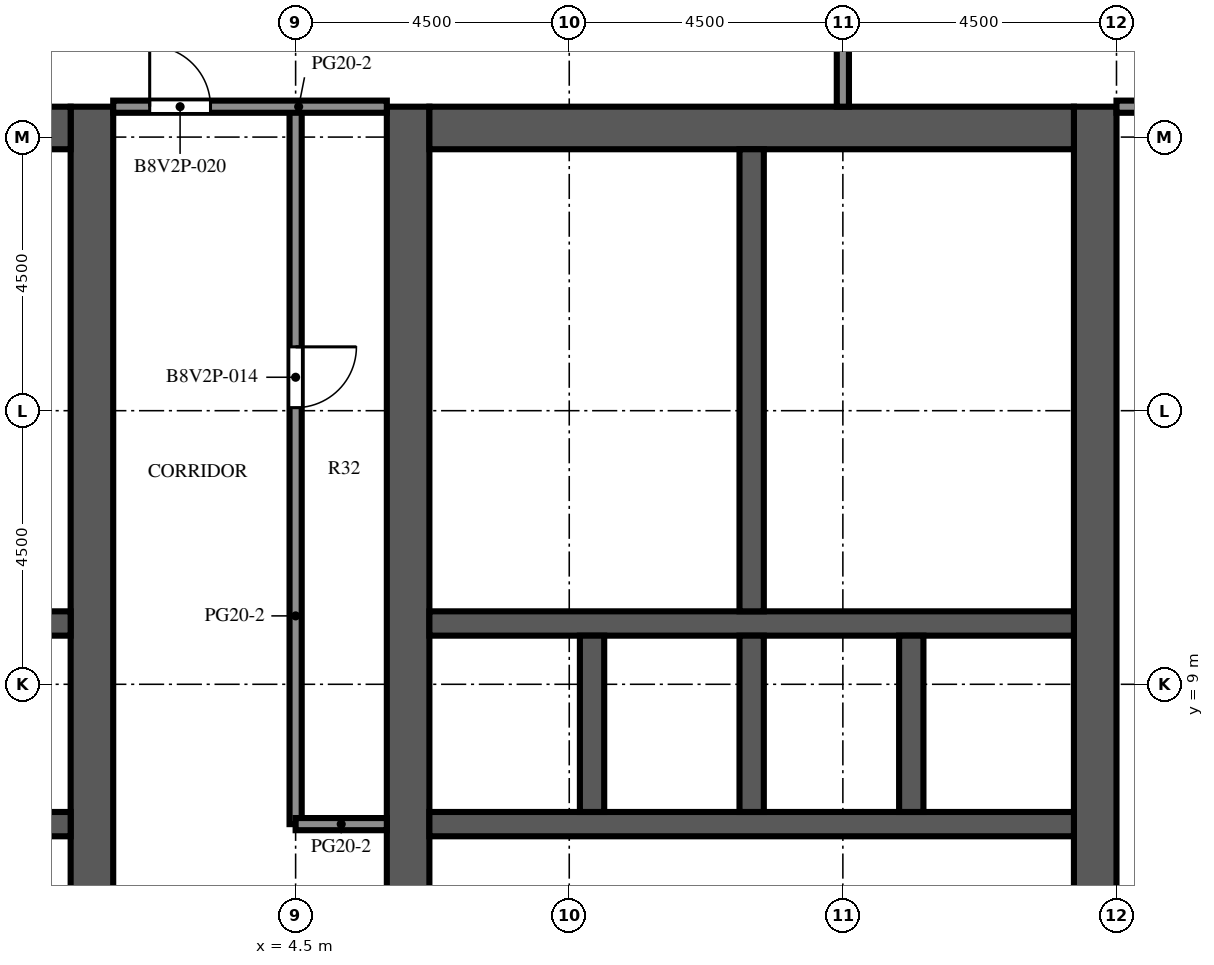
"""IFC4 building model, lengths in metres.
Left out: names, types, materials, properties, quantities, classifications, styles, units other than length and angle.
Written with IfcOpenShell. Run it as: python <this file> out.ifc"""

import sys

from ifc_helpers import new_model, si_unit, direction, frame, frame_2d, origin, place, context, subcontext, project, spatial, rectangle, extrude, element, fill, save


model = new_model("IFC4")
c1 = context("Model", 3, precision=1e-05, world=origin(), true_north=direction((0.0, 1.0)))
c2 = subcontext(c1, "Body", "Model", "MODEL_VIEW")
j1 = project(units=[si_unit("LENGTHUNIT", "METRE"), si_unit("PLANEANGLEUNIT", "RADIAN")], contexts=[c1])
p1 = place(None, origin())
s1 = spatial("IfcSite", under=j1, at=p1, CompositionType="ELEMENT")
p2 = place(p1, origin())
s2 = spatial("IfcBuilding", under=s1, at=p2, CompositionType="ELEMENT")
p3 = place(p2, frame((0.0, 0.0, 290.9)))
s3 = spatial("IfcBuildingStorey", under=s2, at=p3, CompositionType="ELEMENT", Elevation=290.9)
p4 = place(p3, frame((1.15, -9.0, 0.0), z_axis=(0.0, 0.0, 1.0), x_axis=(0.0, 1.0, 0.0)))
e1 = element("IfcWall", 1, at=p4, inside=s3, PredefinedType="SHEAR", context=c2, shape_type="SweptSolid", body=[
    extrude(rectangle(XDim=27.5, YDim=0.7, at=frame_2d((13.75, 0.0))), origin(), (0.0, 0.0, 1.0), 4.1),
])
p5 = place(p4, frame((12.55, 0.0, 0.0)))
e2 = element("IfcOpeningElement", 2, at=p5, cuts=e1, PredefinedType="OPENING", context=c2, shape_type="SweptSolid", body=[
    extrude(rectangle(XDim=2.4, YDim=2.4, at=frame_2d((1.2, 1.2))), frame((0.0, 0.36, 0.0), z_axis=(0.0, -1.0, 0.0), x_axis=(1.0, 0.0, 0.0)), (0.0, 0.0, 1.0), 0.72),
])
p6 = place(p4, frame((3.9, 0.0, 0.0)))
e3 = element("IfcOpeningElement", 3, at=p6, cuts=e1, PredefinedType="OPENING", context=c2, shape_type="SweptSolid", body=[
    extrude(rectangle(XDim=1.2, YDim=2.1, at=frame_2d((0.6, 1.05))), frame((0.0, 0.36, 0.0), z_axis=(0.0, -1.0, 0.0), x_axis=(1.0, 0.0, 0.0)), (0.0, 0.0, 1.0), 0.72),
])
p7 = place(p4, frame((22.4, 0.0, 0.0)))
e4 = element("IfcOpeningElement", 4, at=p7, cuts=e1, PredefinedType="OPENING", context=c2, shape_type="SweptSolid", body=[
    extrude(rectangle(XDim=1.2, YDim=2.1, at=frame_2d((0.6, 1.05))), frame((0.0, 0.36, 0.0), z_axis=(0.0, -1.0, 0.0), x_axis=(1.0, 0.0, 0.0)), (0.0, 0.0, 1.0), 0.72),
])
p8 = place(p3, frame((-9.8, 18.15, 0.0), z_axis=(0.0, 0.0, 1.0), x_axis=(1.0, 0.0, 0.0)))
e5 = element("IfcWall", 5, at=p8, inside=s3, PredefinedType="SHEAR", context=c2, shape_type="SweptSolid", body=[
    extrude(rectangle(XDim=10.6, YDim=0.7, at=frame_2d((5.3, 0.0))), origin(), (0.0, 0.0, 1.0), 4.1),
])
p9 = place(p3, frame((-9.8, 6.7, 0.0), z_axis=(0.0, 0.0, 1.0), x_axis=(1.0, 0.0, 0.0)))
e6 = element("IfcWall", 6, at=p9, inside=s3, PredefinedType="SHEAR", context=c2, shape_type="SweptSolid", body=[
    extrude(rectangle(XDim=10.6, YDim=0.4, at=frame_2d((5.3, 0.0))), origin(), (0.0, 0.0, 1.0), 4.1),
])
p10 = place(p9, frame((3.438, 0.0, 0.0)))
e7 = element("IfcOpeningElement", 7, at=p10, cuts=e6, PredefinedType="OPENING", context=c2, shape_type="SweptSolid", body=[
    extrude(rectangle(XDim=1.1, YDim=2.1, at=frame_2d((0.55, 1.05))), frame((0.0, 0.21, 0.0), z_axis=(0.0, -1.0, 0.0), x_axis=(1.0, 0.0, 0.0)), (0.0, 0.0, 1.0), 0.42),
])
p11 = place(p9, frame((6.062, 0.0, 0.0)))
e8 = element("IfcOpeningElement", 8, at=p11, cuts=e6, PredefinedType="OPENING", context=c2, shape_type="SweptSolid", body=[
    extrude(rectangle(XDim=1.1, YDim=2.1, at=frame_2d((0.55, 1.05))), frame((0.0, 0.21, 0.0), z_axis=(0.0, -1.0, 0.0), x_axis=(1.0, 0.0, 0.0)), (0.0, 0.0, 1.0), 0.42),
])
p12 = place(p9, frame((8.812, 0.0, 0.0)))
e9 = element("IfcOpeningElement", 9, at=p12, cuts=e6, PredefinedType="OPENING", context=c2, shape_type="SweptSolid", body=[
    extrude(rectangle(XDim=1.1, YDim=2.1, at=frame_2d((0.55, 1.05))), frame((0.0, 0.21, 0.0), z_axis=(0.0, -1.0, 0.0), x_axis=(1.0, 0.0, 0.0)), (0.0, 0.0, 1.0), 0.42),
])
p13 = place(p9, frame((0.738, 0.0, 0.0)))
e10 = element("IfcOpeningElement", 10, at=p13, cuts=e6, PredefinedType="OPENING", context=c2, shape_type="SweptSolid", body=[
    extrude(rectangle(XDim=1.0, YDim=2.1, at=frame_2d((0.5, 1.05))), frame((0.0, 0.21, 0.0), z_axis=(0.0, -1.0, 0.0), x_axis=(1.0, 0.0, 0.0)), (0.0, 0.0, 1.0), 0.42),
])
p14 = place(p3, frame((-9.8, 10.0, 0.0), z_axis=(0.0, 0.0, 1.0), x_axis=(1.0, 0.0, 0.0)))
e11 = element("IfcWall", 11, at=p14, inside=s3, PredefinedType="SHEAR", context=c2, shape_type="SweptSolid", body=[
    extrude(rectangle(XDim=10.6, YDim=0.4, at=frame_2d((5.3, 0.0))), origin(), (0.0, 0.0, 1.0), 4.1),
])
p15 = place(p3, frame((6.35, -9.0, 0.0), z_axis=(0.0, 0.0, 1.0), x_axis=(0.0, 1.0, 0.0)))
e12 = element("IfcWall", 12, at=p15, inside=s3, PredefinedType="SHEAR", context=c2, shape_type="SweptSolid", body=[
    extrude(rectangle(XDim=27.5, YDim=0.7, at=frame_2d((13.75, 0.0))), origin(), (0.0, 0.0, 1.0), 4.1),
])
p16 = place(p15, frame((12.55, 0.0, 0.0)))
e13 = element("IfcOpeningElement", 13, at=p16, cuts=e12, PredefinedType="OPENING", context=c2, shape_type="SweptSolid", body=[
    extrude(rectangle(XDim=2.4, YDim=2.4, at=frame_2d((1.2, 1.2))), frame((0.0, 0.36, 0.0), z_axis=(0.0, -1.0, 0.0), x_axis=(1.0, 0.0, 0.0)), (0.0, 0.0, 1.0), 0.72),
])
p17 = place(p15, frame((3.9, 0.0, 0.0)))
e14 = element("IfcOpeningElement", 14, at=p17, cuts=e12, PredefinedType="OPENING", context=c2, shape_type="SweptSolid", body=[
    extrude(rectangle(XDim=1.2, YDim=2.1, at=frame_2d((0.6, 1.05))), frame((0.0, 0.36, 0.0), z_axis=(0.0, -1.0, 0.0), x_axis=(1.0, 0.0, 0.0)), (0.0, 0.0, 1.0), 0.72),
])
p18 = place(p15, frame((22.4, 0.0, 0.0)))
e15 = element("IfcOpeningElement", 15, at=p18, cuts=e12, PredefinedType="OPENING", context=c2, shape_type="SweptSolid", body=[
    extrude(rectangle(XDim=1.2, YDim=2.1, at=frame_2d((0.6, 1.05))), frame((0.0, 0.36, 0.0), z_axis=(0.0, -1.0, 0.0), x_axis=(1.0, 0.0, 0.0)), (0.0, 0.0, 1.0), 0.72),
])
p19 = place(p3, frame((17.65, -9.0, 0.0), z_axis=(0.0, 0.0, 1.0), x_axis=(0.0, 1.0, 0.0)))
e16 = element("IfcWall", 16, at=p19, inside=s3, PredefinedType="SHEAR", context=c2, shape_type="SweptSolid", body=[
    extrude(rectangle(XDim=27.5, YDim=0.7, at=frame_2d((13.75, 0.0))), origin(), (0.0, 0.0, 1.0), 4.1),
])
p20 = place(p19, frame((12.55, 0.0, 0.0)))
e17 = element("IfcOpeningElement", 17, at=p20, cuts=e16, PredefinedType="OPENING", context=c2, shape_type="SweptSolid", body=[
    extrude(rectangle(XDim=2.4, YDim=2.4, at=frame_2d((1.2, 1.2))), frame((0.0, 0.36, 0.0), z_axis=(0.0, -1.0, 0.0), x_axis=(1.0, 0.0, 0.0)), (0.0, 0.0, 1.0), 0.72),
])
p21 = place(p19, frame((6.825, 0.0, 0.0)))
e18 = element("IfcOpeningElement", 18, at=p21, cuts=e16, PredefinedType="OPENING", context=c2, shape_type="SweptSolid", body=[
    extrude(rectangle(XDim=1.2, YDim=2.1, at=frame_2d((0.6, 1.05))), frame((0.0, 0.36, 0.0), z_axis=(0.0, -1.0, 0.0), x_axis=(1.0, 0.0, 0.0)), (0.0, 0.0, 1.0), 0.72),
])
p22 = place(p19, frame((19.475, 0.0, 0.0)))
e19 = element("IfcOpeningElement", 19, at=p22, cuts=e16, PredefinedType="OPENING", context=c2, shape_type="SweptSolid", body=[
    extrude(rectangle(XDim=1.2, YDim=2.1, at=frame_2d((0.6, 1.05))), frame((0.0, 0.36, 0.0), z_axis=(0.0, -1.0, 0.0), x_axis=(1.0, 0.0, 0.0)), (0.0, 0.0, 1.0), 0.72),
])
p23 = place(p3, frame((6.7, 18.15, 0.0), z_axis=(0.0, 0.0, 1.0), x_axis=(1.0, 0.0, 0.0)))
e20 = element("IfcWall", 20, at=p23, inside=s3, PredefinedType="SHEAR", context=c2, shape_type="SweptSolid", body=[
    extrude(rectangle(XDim=10.6, YDim=0.7, at=frame_2d((5.3, 0.0))), origin(), (0.0, 0.0, 1.0), 4.1),
])
p24 = place(p3, frame((6.7, 6.7, 0.0), z_axis=(0.0, 0.0, 1.0), x_axis=(1.0, 0.0, 0.0)))
e21 = element("IfcWall", 21, at=p24, inside=s3, PredefinedType="SHEAR", context=c2, shape_type="SweptSolid", body=[
    extrude(rectangle(XDim=10.6, YDim=0.4, at=frame_2d((5.3, 0.0))), origin(), (0.0, 0.0, 1.0), 4.1),
])
p25 = place(p24, frame((3.438, 0.0, 0.0)))
e22 = element("IfcOpeningElement", 22, at=p25, cuts=e21, PredefinedType="OPENING", context=c2, shape_type="SweptSolid", body=[
    extrude(rectangle(XDim=1.1, YDim=2.1, at=frame_2d((0.55, 1.05))), frame((0.0, 0.21, 0.0), z_axis=(0.0, -1.0, 0.0), x_axis=(1.0, 0.0, 0.0)), (0.0, 0.0, 1.0), 0.42),
])
p26 = place(p24, frame((6.062, 0.0, 0.0)))
e23 = element("IfcOpeningElement", 23, at=p26, cuts=e21, PredefinedType="OPENING", context=c2, shape_type="SweptSolid", body=[
    extrude(rectangle(XDim=1.1, YDim=2.1, at=frame_2d((0.55, 1.05))), frame((0.0, 0.21, 0.0), z_axis=(0.0, -1.0, 0.0), x_axis=(1.0, 0.0, 0.0)), (0.0, 0.0, 1.0), 0.42),
])
p27 = place(p24, frame((8.812, 0.0, 0.0)))
e24 = element("IfcOpeningElement", 24, at=p27, cuts=e21, PredefinedType="OPENING", context=c2, shape_type="SweptSolid", body=[
    extrude(rectangle(XDim=1.1, YDim=2.1, at=frame_2d((0.55, 1.05))), frame((0.0, 0.21, 0.0), z_axis=(0.0, -1.0, 0.0), x_axis=(1.0, 0.0, 0.0)), (0.0, 0.0, 1.0), 0.42),
])
p28 = place(p24, frame((0.738, 0.0, 0.0)))
e25 = element("IfcOpeningElement", 25, at=p28, cuts=e21, PredefinedType="OPENING", context=c2, shape_type="SweptSolid", body=[
    extrude(rectangle(XDim=1.0, YDim=2.1, at=frame_2d((0.5, 1.05))), frame((0.0, 0.21, 0.0), z_axis=(0.0, -1.0, 0.0), x_axis=(1.0, 0.0, 0.0)), (0.0, 0.0, 1.0), 0.42),
])
p29 = place(p3, frame((6.7, 10.0, 0.0), z_axis=(0.0, 0.0, 1.0), x_axis=(1.0, 0.0, 0.0)))
e26 = element("IfcWall", 26, at=p29, inside=s3, PredefinedType="SHEAR", context=c2, shape_type="SweptSolid", body=[
    extrude(rectangle(XDim=10.6, YDim=0.4, at=frame_2d((5.3, 0.0))), origin(), (0.0, 0.0, 1.0), 4.1),
])
for number, where, z_axis, x_axis in (
    (27, (9.375, 6.9, 0.0), (0.0, 0.0, 1.0), (0.0, 1.0, 0.0)),
    (28, (12.0, 6.9, 0.0), (0.0, 0.0, 1.0), (0.0, 1.0, 0.0)),
    (29, (14.625, 6.9, 0.0), (0.0, 0.0, 1.0), (0.0, 1.0, 0.0)),
):
    element("IfcWall", number, at=place(p3, frame(where, z_axis=z_axis, x_axis=x_axis)), inside=s3, PredefinedType="SHEAR", context=c2, shape_type="SweptSolid", body=[
        extrude(rectangle(XDim=2.9, YDim=0.4, at=frame_2d((1.45, 0.0))), origin(), (0.0, 0.0, 1.0), 4.1),
    ])
p30 = place(p3, frame((12.0, 10.2, 0.0), z_axis=(0.0, 0.0, 1.0), x_axis=(0.0, 1.0, 0.0)))
e30 = element("IfcWall", 30, at=p30, inside=s3, PredefinedType="SHEAR", context=c2, shape_type="SweptSolid", body=[
    extrude(rectangle(XDim=7.6, YDim=0.4, at=frame_2d((3.8, 0.0))), origin(), (0.0, 0.0, 1.0), 4.1),
])
p31 = place(p3, frame((8.1, 10.2, 0.0), z_axis=(0.0, 0.0, 1.0), x_axis=(0.0, 1.0, 0.0)))
e31 = element("IfcWall", 31, at=p31, inside=s3, PredefinedType="PARTITIONING", context=c2, shape_type="SweptSolid", body=[
    extrude(rectangle(XDim=2.28, YDim=0.1, at=frame_2d((1.14, 0.0))), origin(), (0.0, 0.0, 1.0), 3.5),
])
p32 = place(p31, frame((0.64, 0.0, 0.0)))
e32 = element("IfcOpeningElement", 32, at=p32, cuts=e31, PredefinedType="OPENING", context=c2, shape_type="SweptSolid", body=[
    extrude(rectangle(XDim=1.0, YDim=2.1, at=frame_2d((0.5, 1.05))), frame((0.0, 0.06, 0.0), z_axis=(0.0, -1.0, 0.0), x_axis=(1.0, 0.0, 0.0)), (0.0, 0.0, 1.0), 0.12),
])
p33 = place(p3, frame((8.1, 12.48, 0.0), z_axis=(0.0, 0.0, 1.0), x_axis=(0.0, 1.0, 0.0)))
e33 = element("IfcWall", 33, at=p33, inside=s3, PredefinedType="PARTITIONING", context=c2, shape_type="SweptSolid", body=[
    extrude(rectangle(XDim=2.432, YDim=0.1, at=frame_2d((1.216, 0.0))), origin(), (0.0, 0.0, 1.0), 3.5),
])
p34 = place(p33, frame((0.716, 0.0, 0.0)))
e34 = element("IfcOpeningElement", 34, at=p34, cuts=e33, PredefinedType="OPENING", context=c2, shape_type="SweptSolid", body=[
    extrude(rectangle(XDim=1.0, YDim=2.1, at=frame_2d((0.5, 1.05))), frame((0.0, 0.06, 0.0), z_axis=(0.0, -1.0, 0.0), x_axis=(1.0, 0.0, 0.0)), (0.0, 0.0, 1.0), 0.12),
])
p35 = place(p3, frame((8.1, 14.912, 0.0), z_axis=(0.0, 0.0, 1.0), x_axis=(0.0, 1.0, 0.0)))
e35 = element("IfcWall", 35, at=p35, inside=s3, PredefinedType="PARTITIONING", context=c2, shape_type="SweptSolid", body=[
    extrude(rectangle(XDim=2.888, YDim=0.1, at=frame_2d((1.444, 0.0))), origin(), (0.0, 0.0, 1.0), 3.5),
])
p36 = place(p35, frame((0.944, 0.0, 0.0)))
e36 = element("IfcOpeningElement", 36, at=p36, cuts=e35, PredefinedType="OPENING", context=c2, shape_type="SweptSolid", body=[
    extrude(rectangle(XDim=1.0, YDim=2.1, at=frame_2d((0.5, 1.05))), frame((0.0, 0.06, 0.0), z_axis=(0.0, -1.0, 0.0), x_axis=(1.0, 0.0, 0.0)), (0.0, 0.0, 1.0), 0.12),
])
for number, where, z_axis, x_axis in (
    (37, (8.1, 12.48, 0.0), (0.0, 0.0, 1.0), (1.0, 0.0, 0.0)),
    (38, (8.1, 14.912, 0.0), (0.0, 0.0, 1.0), (1.0, 0.0, 0.0)),
):
    element("IfcWall", number, at=place(p3, frame(where, z_axis=z_axis, x_axis=x_axis)), inside=s3, PredefinedType="PARTITIONING", context=c2, shape_type="SweptSolid", body=[
        extrude(rectangle(XDim=3.7, YDim=0.1, at=frame_2d((1.85, 0.0))), origin(), (0.0, 0.0, 1.0), 3.5),
    ])
p37 = place(p3, frame((4.5, 18.5, 0.0), z_axis=(0.0, 0.0, 1.0), x_axis=(0.0, -1.0, 0.0)))
e39 = element("IfcWall", 39, at=p37, inside=s3, PredefinedType="PARTITIONING", context=c2, shape_type="SweptSolid", body=[
    extrude(rectangle(XDim=11.8, YDim=0.2, at=frame_2d((5.9, 0.0))), origin(), (0.0, 0.0, 1.0), 3.5),
])
p38 = place(p37, frame((3.95, 0.0, 0.0)))
e40 = element("IfcOpeningElement", 40, at=p38, cuts=e39, PredefinedType="OPENING", context=c2, shape_type="SweptSolid", body=[
    extrude(rectangle(XDim=1.0, YDim=2.1, at=frame_2d((0.5, 1.05))), frame((0.0, 0.11, 0.0), z_axis=(0.0, -1.0, 0.0), x_axis=(1.0, 0.0, 0.0)), (0.0, 0.0, 1.0), 0.22),
])
p39 = place(p3, frame((13.5, 18.5, 0.0), z_axis=(0.0, 0.0, 1.0), x_axis=(0.0, 1.0, 0.0)))
e41 = element("IfcWall", 41, at=p39, inside=s3, PredefinedType="PARTITIONING", context=c2, shape_type="SweptSolid", body=[
    extrude(rectangle(XDim=8.1, YDim=0.2, at=frame_2d((4.05, 0.0))), origin(), (0.0, 0.0, 1.0), 3.5),
])
p40 = place(p3, frame((4.5, 6.7, 0.0), z_axis=(0.0, 0.0, 1.0), x_axis=(1.0, 0.0, 0.0)))
e42 = element("IfcWall", 42, at=p40, inside=s3, PredefinedType="PARTITIONING", context=c2, shape_type="SweptSolid", body=[
    extrude(rectangle(XDim=1.5, YDim=0.2, at=frame_2d((0.75, 0.0))), origin(), (0.0, 0.0, 1.0), 3.5),
])
p41 = place(p3, frame((1.5, 18.5, 0.0), z_axis=(0.0, 0.0, 1.0), x_axis=(1.0, 0.0, 0.0)))
e43 = element("IfcWall", 43, at=p41, inside=s3, PredefinedType="PARTITIONING", context=c2, shape_type="SweptSolid", body=[
    extrude(rectangle(XDim=4.5, YDim=0.2, at=frame_2d((2.25, 0.0))), origin(), (0.0, 0.0, 1.0), 3.5),
])
p42 = place(p41, frame((0.6, 0.0, 0.0)))
e44 = element("IfcOpeningElement", 44, at=p42, cuts=e43, PredefinedType="OPENING", context=c2, shape_type="SweptSolid", body=[
    extrude(rectangle(XDim=1.0, YDim=2.1, at=frame_2d((0.5, 1.05))), frame((0.0, 0.11, 0.0), z_axis=(0.0, -1.0, 0.0), x_axis=(1.0, 0.0, 0.0)), (0.0, 0.0, 1.0), 0.22),
])
p43 = place(p3, frame((18.0, 18.5, 0.0), z_axis=(0.0, 0.0, 1.0), x_axis=(1.0, 0.0, 0.0)))
e45 = element("IfcWall", 45, at=p43, inside=s3, PredefinedType="PARTITIONING", context=c2, shape_type="SweptSolid", body=[
    extrude(rectangle(XDim=4.201, YDim=0.2, at=frame_2d((2.101, 0.0))), origin(), (0.0, 0.0, 1.0), 3.5),
])
p44 = place(p43, frame((1.1, 0.0, 0.0)))
e46 = element("IfcOpeningElement", 46, at=p44, cuts=e45, PredefinedType="OPENING", context=c2, shape_type="SweptSolid", body=[
    extrude(rectangle(XDim=1.0, YDim=2.1, at=frame_2d((0.5, 1.05))), frame((0.0, 0.11, 0.0), z_axis=(0.0, -1.0, 0.0), x_axis=(1.0, 0.0, 0.0)), (0.0, 0.0, 1.0), 0.22),
])
p45 = place(p25, origin())
e47 = element("IfcDoor", 47, at=p45, inside=s3, OperationType="DOUBLE_DOOR_SLIDING", PredefinedType="DOOR", context=c2, shape_type="SweptSolid", body=[
    extrude(rectangle(XDim=1.1, YDim=2.1, at=frame_2d((0.55, 1.05))), frame((0.0, 0.025, 0.0), z_axis=(0.0, -1.0, 0.0), x_axis=(1.0, 0.0, 0.0)), (0.0, 0.0, 1.0), 0.05),
])
fill(e22, e47)
p46 = place(p26, origin())
e48 = element("IfcDoor", 48, at=p46, inside=s3, OperationType="DOUBLE_DOOR_SLIDING", PredefinedType="DOOR", context=c2, shape_type="SweptSolid", body=[
    extrude(rectangle(XDim=1.1, YDim=2.1, at=frame_2d((0.55, 1.05))), frame((0.0, 0.025, 0.0), z_axis=(0.0, -1.0, 0.0), x_axis=(1.0, 0.0, 0.0)), (0.0, 0.0, 1.0), 0.05),
])
fill(e23, e48)
p47 = place(p27, origin())
e49 = element("IfcDoor", 49, at=p47, inside=s3, OperationType="DOUBLE_DOOR_SLIDING", PredefinedType="DOOR", context=c2, shape_type="SweptSolid", body=[
    extrude(rectangle(XDim=1.1, YDim=2.1, at=frame_2d((0.55, 1.05))), frame((0.0, 0.025, 0.0), z_axis=(0.0, -1.0, 0.0), x_axis=(1.0, 0.0, 0.0)), (0.0, 0.0, 1.0), 0.05),
])
fill(e24, e49)
p48 = place(p5, origin())
e50 = element("IfcDoor", 50, at=p48, inside=s3, OperationType="DOUBLE_DOOR_DOUBLE_SWING", PredefinedType="DOOR", context=c2, shape_type="SweptSolid", body=[
    extrude(rectangle(XDim=2.4, YDim=2.4, at=frame_2d((1.2, 1.2))), frame((0.0, 0.025, 0.0), z_axis=(0.0, -1.0, 0.0), x_axis=(1.0, 0.0, 0.0)), (0.0, 0.0, 1.0), 0.05),
])
fill(e2, e50)
p49 = place(p16, origin())
e51 = element("IfcDoor", 51, at=p49, inside=s3, OperationType="DOUBLE_DOOR_DOUBLE_SWING", PredefinedType="DOOR", context=c2, shape_type="SweptSolid", body=[
    extrude(rectangle(XDim=2.4, YDim=2.4, at=frame_2d((1.2, 1.2))), frame((0.0, 0.025, 0.0), z_axis=(0.0, -1.0, 0.0), x_axis=(1.0, 0.0, 0.0)), (0.0, 0.0, 1.0), 0.05),
])
fill(e13, e51)
p50 = place(p20, origin())
e52 = element("IfcDoor", 52, at=p50, inside=s3, OperationType="DOUBLE_DOOR_DOUBLE_SWING", PredefinedType="DOOR", context=c2, shape_type="SweptSolid", body=[
    extrude(rectangle(XDim=2.4, YDim=2.4, at=frame_2d((1.2, 1.2))), frame((0.0, 0.025, 0.0), z_axis=(0.0, -1.0, 0.0), x_axis=(1.0, 0.0, 0.0)), (0.0, 0.0, 1.0), 0.05),
])
fill(e17, e52)
p51 = place(p22, frame((1.2, 0.0, 0.0), z_axis=(0.0, 0.0, 1.0), x_axis=(-1.0, 0.0, 0.0)))
e53 = element("IfcDoor", 53, at=p51, inside=s3, OperationType="SINGLE_SWING_LEFT", PredefinedType="DOOR", context=c2, shape_type="SweptSolid", body=[
    extrude(rectangle(XDim=1.2, YDim=2.1, at=frame_2d((0.6, 1.05))), frame((0.0, 0.025, 0.0), z_axis=(0.0, -1.0, 0.0), x_axis=(1.0, 0.0, 0.0)), (0.0, 0.0, 1.0), 0.05),
])
fill(e19, e53)
p52 = place(p7, origin())
e54 = element("IfcDoor", 54, at=p52, inside=s3, OperationType="SINGLE_SWING_LEFT", PredefinedType="DOOR", context=c2, shape_type="SweptSolid", body=[
    extrude(rectangle(XDim=1.2, YDim=2.1, at=frame_2d((0.6, 1.05))), frame((0.0, 0.325, 0.0), z_axis=(0.0, -1.0, 0.0), x_axis=(1.0, 0.0, 0.0)), (0.0, 0.0, 1.0), 0.05),
])
fill(e4, e54)
p53 = place(p28, origin())
e55 = element("IfcDoor", 55, at=p53, inside=s3, OperationType="SINGLE_SWING_LEFT", PredefinedType="DOOR", context=c2, shape_type="SweptSolid", body=[
    extrude(rectangle(XDim=1.0, YDim=2.1, at=frame_2d((0.5, 1.05))), frame((0.0, 0.025, 0.0), z_axis=(0.0, -1.0, 0.0), x_axis=(1.0, 0.0, 0.0)), (0.0, 0.0, 1.0), 0.05),
])
fill(e25, e55)
p54 = place(p18, origin())
e56 = element("IfcDoor", 56, at=p54, inside=s3, OperationType="SINGLE_SWING_RIGHT", PredefinedType="DOOR", context=c2, shape_type="SweptSolid", body=[
    extrude(rectangle(XDim=1.2, YDim=2.1, at=frame_2d((0.6, 1.05))), frame((0.0, -0.275, 0.0), z_axis=(0.0, -1.0, 0.0), x_axis=(1.0, 0.0, 0.0)), (0.0, 0.0, 1.0), 0.05),
])
fill(e15, e56)
p55 = place(p32, origin())
e57 = element("IfcDoor", 57, at=p55, inside=s3, OperationType="SINGLE_SWING_LEFT", PredefinedType="DOOR", context=c2, shape_type="SweptSolid", body=[
    extrude(rectangle(XDim=1.0, YDim=2.1, at=frame_2d((0.5, 1.05))), frame((0.0, 0.025, 0.0), z_axis=(0.0, -1.0, 0.0), x_axis=(1.0, 0.0, 0.0)), (0.0, 0.0, 1.0), 0.05),
])
fill(e32, e57)
p56 = place(p34, origin())
e58 = element("IfcDoor", 58, at=p56, inside=s3, OperationType="SINGLE_SWING_RIGHT", PredefinedType="DOOR", context=c2, shape_type="SweptSolid", body=[
    extrude(rectangle(XDim=1.0, YDim=2.1, at=frame_2d((0.5, 1.05))), frame((0.0, 0.025, 0.0), z_axis=(0.0, -1.0, 0.0), x_axis=(1.0, 0.0, 0.0)), (0.0, 0.0, 1.0), 0.05),
])
fill(e34, e58)
p57 = place(p36, origin())
e59 = element("IfcDoor", 59, at=p57, inside=s3, OperationType="SINGLE_SWING_LEFT", PredefinedType="DOOR", context=c2, shape_type="SweptSolid", body=[
    extrude(rectangle(XDim=1.0, YDim=2.1, at=frame_2d((0.5, 1.05))), frame((0.0, 0.025, 0.0), z_axis=(0.0, -1.0, 0.0), x_axis=(1.0, 0.0, 0.0)), (0.0, 0.0, 1.0), 0.05),
])
fill(e36, e59)
p58 = place(p38, origin())
e60 = element("IfcDoor", 60, at=p58, inside=s3, OperationType="SINGLE_SWING_LEFT", PredefinedType="DOOR", context=c2, shape_type="SweptSolid", body=[
    extrude(rectangle(XDim=1.0, YDim=2.1, at=frame_2d((0.5, 1.05))), frame((0.0, 0.025, 0.0), z_axis=(0.0, -1.0, 0.0), x_axis=(1.0, 0.0, 0.0)), (0.0, 0.0, 1.0), 0.05),
])
fill(e40, e60)
p59 = place(p42, origin())
e61 = element("IfcDoor", 61, at=p59, inside=s3, OperationType="SINGLE_SWING_LEFT", PredefinedType="DOOR", context=c2, shape_type="SweptSolid", body=[
    extrude(rectangle(XDim=1.0, YDim=2.1, at=frame_2d((0.5, 1.05))), frame((0.0, 0.025, 0.0), z_axis=(0.0, -1.0, 0.0), x_axis=(1.0, 0.0, 0.0)), (0.0, 0.0, 1.0), 0.05),
])
fill(e44, e61)
save(model, sys.argv[1])
